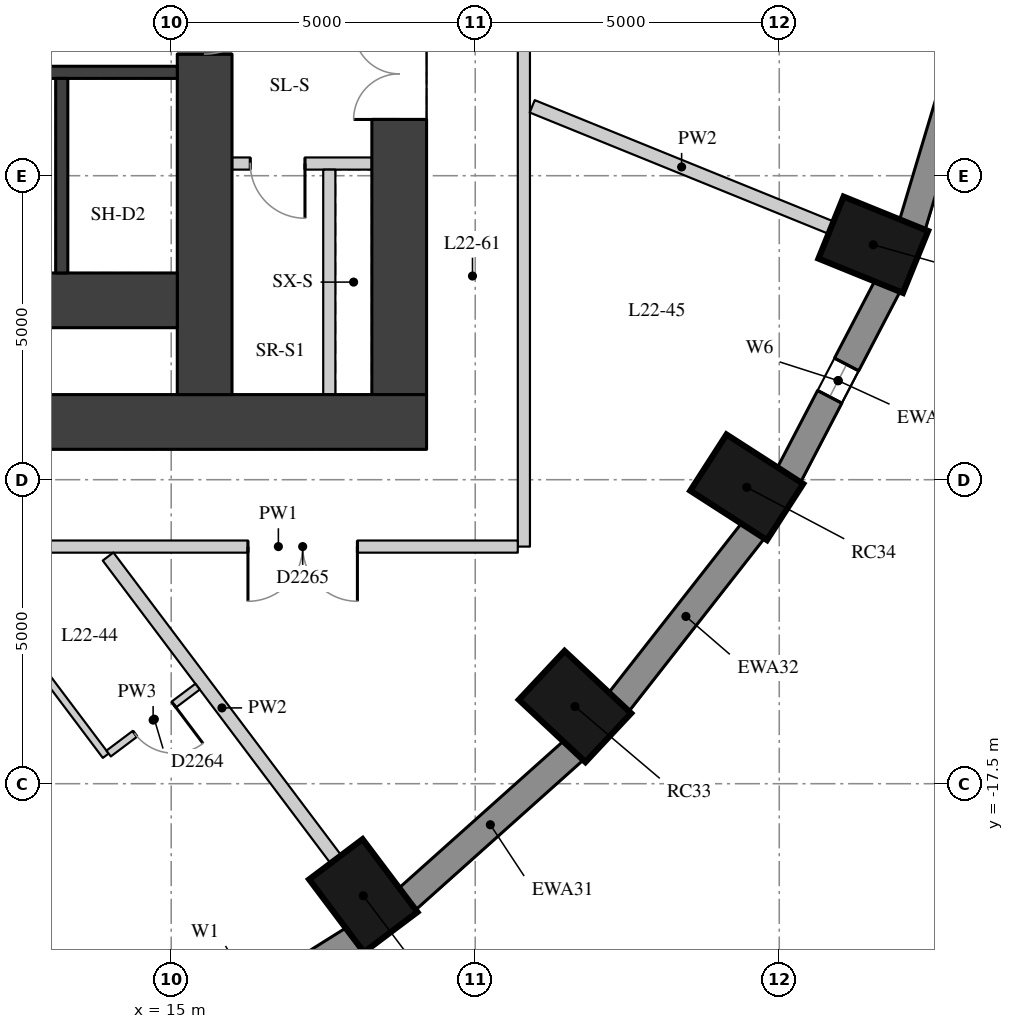
"""IFC4 building model, lengths in metres.
Left out: names, types, materials, properties, quantities, classifications, styles, units other than length and angle.
Written with IfcOpenShell. Run it as: python <this file> out.ifc"""

import sys

from ifc_helpers import new_model, si_unit, direction, frame, frame_2d, origin, origin_2d, place, context, subcontext, project, spatial, rectangle, extrude, element, fill, save


model = new_model("IFC4")
c1 = context("Model", 3, precision=1e-05, world=origin(), true_north=direction((0.0, 1.0)))
c2 = subcontext(c1, "Body", "Model", "MODEL_VIEW")
j1 = project(units=[si_unit("LENGTHUNIT", "METRE"), si_unit("PLANEANGLEUNIT", "RADIAN")], contexts=[c1])
p1 = place(None, origin())
s1 = spatial("IfcSite", under=j1, at=p1, CompositionType="ELEMENT")
p2 = place(p1, origin())
s2 = spatial("IfcBuilding", under=s1, at=p2, CompositionType="ELEMENT")
p3 = place(p2, frame((0.0, 0.0, 81.1)))
s3 = spatial("IfcBuildingStorey", under=s2, at=p3, CompositionType="ELEMENT", Elevation=81.1)
for number, where, z_axis, x_axis in (
    (1, (18.159, -19.343, 0.0), (0.0, 0.0, 1.0), (0.601, -0.799, 0.0)),
    (2, (21.641, -16.23, 0.0), (0.0, 0.0, 1.0), (0.73, -0.683, 0.0)),
    (3, (24.465, -12.625, 0.0), (0.0, 0.0, 1.0), (0.841, -0.541, 0.0)),
    (4, (26.546, -8.636, 0.0), (0.0, 0.0, 1.0), (0.927, -0.376, 0.0)),
):
    element("IfcColumn", number, at=place(p3, frame(where, z_axis=z_axis, x_axis=x_axis)), inside=s3, PredefinedType="COLUMN", context=c2, shape_type="SweptSolid", body=[
        extrude(rectangle(XDim=1.5, YDim=1.1, at=origin_2d()), origin(), (0.0, 0.0, 1.0), 3.3),
    ])
p4 = place(p3, frame((14.817, -22.051, 0.0), z_axis=(0.0, 0.0, 1.0), x_axis=(0.847635480093, 0.530579016629, 0.0)))
e5 = element("IfcWall", 5, at=p4, inside=s3, PredefinedType="SOLIDWALL", context=c2, shape_type="SweptSolid", body=[
    extrude(rectangle(XDim=3.782, YDim=0.45, at=frame_2d((1.891, 0.0))), origin(), (0.0, 0.0, 1.0), 2.85),
])
p5 = place(p4, frame((0.791, 0.0, 0.4)))
e6 = element("IfcOpeningElement", 6, at=p5, cuts=e5, PredefinedType="OPENING", context=c2, shape_type="SweptSolid", body=[
    extrude(rectangle(XDim=2.2, YDim=1.75, at=frame_2d((1.1, 0.875))), frame((0.0, 0.235, 0.0), z_axis=(0.0, -1.0, 0.0), x_axis=(1.0, 0.0, 0.0)), (0.0, 0.0, 1.0), 0.47),
])
p6 = place(p3, frame((18.871, -19.407, 0.0), z_axis=(0.0, 0.0, 1.0), x_axis=(0.745526233716, 0.66647628228, 0.0)))
e7 = element("IfcWall", 7, at=p6, inside=s3, PredefinedType="SOLIDWALL", context=c2, shape_type="SweptSolid", body=[
    extrude(rectangle(XDim=3.697, YDim=0.45, at=frame_2d((1.848, 0.0))), origin(), (0.0, 0.0, 1.0), 2.85),
])
p7 = place(p3, frame((22.352, -16.17, 0.0), z_axis=(0.0, 0.0, 1.0), x_axis=(0.616661975264, 0.787228053529, 0.0)))
e8 = element("IfcWall", 8, at=p7, inside=s3, PredefinedType="SOLIDWALL", context=c2, shape_type="SweptSolid", body=[
    extrude(rectangle(XDim=3.61, YDim=0.45, at=frame_2d((1.805, 0.0))), origin(), (0.0, 0.0, 1.0), 2.85),
])
p8 = place(p3, frame((25.152, -12.437, 0.0), z_axis=(0.0, 0.0, 1.0), x_axis=(0.462492775226, 0.886623050041, 0.0)))
e9 = element("IfcWall", 9, at=p8, inside=s3, PredefinedType="SOLIDWALL", context=c2, shape_type="SweptSolid", body=[
    extrude(rectangle(XDim=3.532, YDim=0.45, at=frame_2d((1.766, 0.0))), origin(), (0.0, 0.0, 1.0), 2.85),
])
p9 = place(p8, frame((1.466, 0.0, 0.4)))
e10 = element("IfcOpeningElement", 10, at=p9, cuts=e9, PredefinedType="OPENING", context=c2, shape_type="SweptSolid", body=[
    extrude(rectangle(XDim=0.6, YDim=1.75, at=frame_2d((0.3, 0.875))), frame((0.0, 0.235, 0.0), z_axis=(0.0, -1.0, 0.0), x_axis=(1.0, 0.0, 0.0)), (0.0, 0.0, 1.0), 0.47),
])
p10 = place(p3, frame((27.185, -8.323, 0.0), z_axis=(0.0, 0.0, 1.0), x_axis=(0.287064133733, 0.957911364963, 0.0)))
e11 = element("IfcWall", 11, at=p10, inside=s3, PredefinedType="SOLIDWALL", context=c2, shape_type="SweptSolid", body=[
    extrude(rectangle(XDim=3.473, YDim=0.45, at=frame_2d((1.737, 0.0))), origin(), (0.0, 0.0, 1.0), 2.85),
])
p11 = place(p3, frame((18.75, -11.1, 0.0), z_axis=(0.0, 0.0, 1.0), x_axis=(0.0, 1.0, 0.0)))
e12 = element("IfcWall", 12, at=p11, inside=s3, PredefinedType="SHEAR", context=c2, shape_type="SweptSolid", body=[
    extrude(rectangle(XDim=22.2, YDim=0.9, at=frame_2d((11.1, 0.0))), origin(), (0.0, 0.0, 1.0), 2.85),
])
p12 = place(p11, frame((15.925, 0.0, 0.0)))
e13 = element("IfcOpeningElement", 13, at=p12, cuts=e12, PredefinedType="OPENING", context=c2, shape_type="SweptSolid", body=[
    extrude(rectangle(XDim=1.5, YDim=2.1, at=frame_2d((0.75, 1.05))), frame((0.0, 0.46, 0.0), z_axis=(0.0, -1.0, 0.0), x_axis=(1.0, 0.0, 0.0)), (0.0, 0.0, 1.0), 0.92),
])
p13 = place(p11, frame((4.525, 0.0, 0.0)))
e14 = element("IfcOpeningElement", 14, at=p13, cuts=e12, PredefinedType="OPENING", context=c2, shape_type="SweptSolid", body=[
    extrude(rectangle(XDim=1.5, YDim=2.1, at=frame_2d((0.75, 1.05))), frame((0.0, 0.46, 0.0), z_axis=(0.0, -1.0, 0.0), x_axis=(1.0, 0.0, 0.0)), (0.0, 0.0, 1.0), 0.92),
])
p14 = place(p3, frame((4.0, -11.55, 0.0), z_axis=(0.0, 0.0, 1.0), x_axis=(1.0, 0.0, 0.0)))
e15 = element("IfcWall", 15, at=p14, inside=s3, PredefinedType="SHEAR", context=c2, shape_type="SweptSolid", body=[
    extrude(rectangle(XDim=15.2, YDim=0.9, at=frame_2d((7.6, 0.0))), origin(), (0.0, 0.0, 1.0), 2.85),
])
p15 = place(p3, frame((15.55, -11.1, 0.0), z_axis=(0.0, 0.0, 1.0), x_axis=(0.0, 1.0, 0.0)))
e16 = element("IfcWall", 16, at=p15, inside=s3, PredefinedType="SHEAR", context=c2, shape_type="SweptSolid", body=[
    extrude(rectangle(XDim=22.2, YDim=0.9, at=frame_2d((11.1, 0.0))), origin(), (0.0, 0.0, 1.0), 2.85),
])
p16 = place(p15, frame((15.6, 0.0, 0.0)))
e17 = element("IfcOpeningElement", 17, at=p16, cuts=e16, PredefinedType="OPENING", context=c2, shape_type="SweptSolid", body=[
    extrude(rectangle(XDim=1.0, YDim=2.1, at=frame_2d((0.5, 1.05))), frame((0.0, 0.46, 0.0), z_axis=(0.0, -1.0, 0.0), x_axis=(1.0, 0.0, 0.0)), (0.0, 0.0, 1.0), 0.92),
])
p17 = place(p15, frame((5.6, 0.0, 0.0)))
e18 = element("IfcOpeningElement", 18, at=p17, cuts=e16, PredefinedType="OPENING", context=c2, shape_type="SweptSolid", body=[
    extrude(rectangle(XDim=1.0, YDim=2.1, at=frame_2d((0.5, 1.05))), frame((0.0, 0.46, 0.0), z_axis=(0.0, -1.0, 0.0), x_axis=(1.0, 0.0, 0.0)), (0.0, 0.0, 1.0), 0.92),
])
p18 = place(p3, frame((4.9, -9.55, 0.0), z_axis=(0.0, 0.0, 1.0), x_axis=(1.0, 0.0, 0.0)))
e19 = element("IfcWall", 19, at=p18, inside=s3, PredefinedType="SHEAR", context=c2, shape_type="SweptSolid", body=[
    extrude(rectangle(XDim=10.2, YDim=0.9, at=frame_2d((5.1, 0.0))), origin(), (0.0, 0.0, 1.0), 2.85),
])
p19 = place(p3, frame((4.9, -5.8, 0.0), z_axis=(0.0, 0.0, 1.0), x_axis=(1.0, 0.0, 0.0)))
e20 = element("IfcWall", 20, at=p19, inside=s3, PredefinedType="SHEAR", context=c2, shape_type="SweptSolid", body=[
    extrude(rectangle(XDim=10.2, YDim=0.2, at=frame_2d((5.1, 0.0))), origin(), (0.0, 0.0, 1.0), 2.85),
])
p20 = place(p3, frame((13.2, -9.1, 0.0), z_axis=(0.0, 0.0, 1.0), x_axis=(0.0, 1.0, 0.0)))
e21 = element("IfcWall", 21, at=p20, inside=s3, PredefinedType="SHEAR", context=c2, shape_type="SweptSolid", body=[
    extrude(rectangle(XDim=3.2, YDim=0.2, at=frame_2d((1.6, 0.0))), origin(), (0.0, 0.0, 1.0), 2.85),
])
p21 = place(p3, frame((16.0, -7.3, 0.0), z_axis=(0.0, 0.0, 1.0), x_axis=(1.0, 0.0, 0.0)))
e22 = element("IfcWall", 22, at=p21, inside=s3, PredefinedType="PARTITIONING", context=c2, shape_type="SweptSolid", body=[
    extrude(rectangle(XDim=2.3, YDim=0.2, at=frame_2d((1.15, 0.0))), origin(), (0.0, 0.0, 1.0), 2.85),
])
p22 = place(p21, frame((0.3, 0.0, 0.0)))
e23 = element("IfcOpeningElement", 23, at=p22, cuts=e22, PredefinedType="OPENING", context=c2, shape_type="SweptSolid", body=[
    extrude(rectangle(XDim=0.9, YDim=2.1, at=frame_2d((0.45, 1.05))), frame((0.0, 0.11, 0.0), z_axis=(0.0, -1.0, 0.0), x_axis=(1.0, 0.0, 0.0)), (0.0, 0.0, 1.0), 0.22),
])
p23 = place(p3, frame((17.6, -11.1, 0.0), z_axis=(0.0, 0.0, 1.0), x_axis=(0.0, 1.0, 0.0)))
e24 = element("IfcWall", 24, at=p23, inside=s3, PredefinedType="PARTITIONING", context=c2, shape_type="SweptSolid", body=[
    extrude(rectangle(XDim=3.7, YDim=0.2, at=frame_2d((1.85, 0.0))), origin(), (0.0, 0.0, 1.0), 2.85),
])
p24 = place(p3, frame((20.8, 13.5, 0.0), z_axis=(0.0, 0.0, 1.0), x_axis=(0.0, -1.0, 0.0)))
e25 = element("IfcWall", 25, at=p24, inside=s3, PredefinedType="PARTITIONING", context=c2, shape_type="SweptSolid", body=[
    extrude(rectangle(XDim=27.1, YDim=0.2, at=frame_2d((13.55, 0.0))), origin(), (0.0, 0.0, 1.0), 2.85),
])
p25 = place(p24, frame((14.149, 0.0, 0.0)))
e26 = element("IfcOpeningElement", 26, at=p25, cuts=e25, PredefinedType="OPENING", context=c2, shape_type="SweptSolid", body=[
    extrude(rectangle(XDim=1.8, YDim=2.1, at=frame_2d((0.9, 1.05))), frame((0.0, 0.11, 0.0), z_axis=(0.0, -1.0, 0.0), x_axis=(1.0, 0.0, 0.0)), (0.0, 0.0, 1.0), 0.22),
])
p26 = place(p24, frame((4.454, 0.0, 0.0)))
e27 = element("IfcOpeningElement", 27, at=p26, cuts=e25, PredefinedType="OPENING", context=c2, shape_type="SweptSolid", body=[
    extrude(rectangle(XDim=1.8, YDim=2.1, at=frame_2d((0.9, 1.05))), frame((0.0, 0.11, 0.0), z_axis=(0.0, -1.0, 0.0), x_axis=(1.0, 0.0, 0.0)), (0.0, 0.0, 1.0), 0.22),
])
p27 = place(p3, frame((20.7, -13.6, 0.0), z_axis=(0.0, 0.0, 1.0), x_axis=(-1.0, 0.0, 0.0)))
e28 = element("IfcWall", 28, at=p27, inside=s3, PredefinedType="PARTITIONING", context=c2, shape_type="SweptSolid", body=[
    extrude(rectangle(XDim=7.875, YDim=0.2, at=frame_2d((3.938, 0.0))), origin(), (0.0, 0.0, 1.0), 2.85),
])
p28 = place(p27, frame((2.638, 0.0, 0.0)))
e29 = element("IfcOpeningElement", 29, at=p28, cuts=e28, PredefinedType="OPENING", context=c2, shape_type="SweptSolid", body=[
    extrude(rectangle(XDim=1.8, YDim=2.1, at=frame_2d((0.9, 1.05))), frame((0.0, 0.11, 0.0), z_axis=(0.0, -1.0, 0.0), x_axis=(1.0, 0.0, 0.0)), (0.0, 0.0, 1.0), 0.22),
])
p29 = place(p3, frame((17.708, -18.743, 0.0), z_axis=(0.0, 0.0, 1.0), x_axis=(-0.601177883261, 0.799115231164, 0.0)))
e30 = element("IfcWall", 30, at=p29, inside=s3, PredefinedType="PARTITIONING", context=c2, shape_type="SweptSolid", body=[
    extrude(rectangle(XDim=6.231, YDim=0.22, at=frame_2d((3.116, 0.0))), origin(), (0.0, 0.0, 1.0), 2.85),
])
p30 = place(p3, frame((25.851, -8.354, 0.0), z_axis=(0.0, 0.0, 1.0), x_axis=(-0.926546814299, 0.376179479653, 0.0)))
e31 = element("IfcWall", 31, at=p30, inside=s3, PredefinedType="PARTITIONING", context=c2, shape_type="SweptSolid", body=[
    extrude(rectangle(XDim=5.304, YDim=0.22, at=frame_2d((2.652, 0.0))), origin(), (0.0, 0.0, 1.0), 2.85),
])
p31 = place(p3, frame((11.825, -14.251, 0.0), z_axis=(0.0, 0.0, 1.0), x_axis=(0.601196964615, -0.799100875821, 0.0)))
e32 = element("IfcWall", 32, at=p31, inside=s3, PredefinedType="PARTITIONING", context=c2, shape_type="SweptSolid", body=[
    extrude(rectangle(XDim=3.49, YDim=0.12, at=frame_2d((1.745, 0.0))), origin(), (0.0, 0.0, 1.0), 2.85),
])
p32 = place(p3, frame((13.971, -17.004, 0.0), z_axis=(0.0, 0.0, 1.0), x_axis=(0.799231057954, 0.60102388971, 0.0)))
e33 = element("IfcWall", 33, at=p32, inside=s3, PredefinedType="PARTITIONING", context=c2, shape_type="SweptSolid", body=[
    extrude(rectangle(XDim=1.83, YDim=0.12, at=frame_2d((0.915, 0.0))), origin(), (0.0, 0.0, 1.0), 2.85),
])
p33 = place(p32, frame((0.54, 0.0, 0.0)))
e34 = element("IfcOpeningElement", 34, at=p33, cuts=e33, PredefinedType="OPENING", context=c2, shape_type="SweptSolid", body=[
    extrude(rectangle(XDim=0.8, YDim=2.1, at=frame_2d((0.4, 1.05))), frame((0.0, 0.07, 0.0), z_axis=(0.0, -1.0, 0.0), x_axis=(1.0, 0.0, 0.0)), (0.0, 0.0, 1.0), 0.14),
])
p34 = place(p9, origin())
e35 = element("IfcWindow", 35, at=p34, inside=s3, PartitioningType="SINGLE_PANEL", PredefinedType="WINDOW", context=c2, shape_type="SweptSolid", body=[
    extrude(rectangle(XDim=0.6, YDim=1.75, at=frame_2d((0.3, 0.875))), frame((0.0, 0.035, 0.0), z_axis=(0.0, -1.0, 0.0), x_axis=(1.0, 0.0, 0.0)), (0.0, 0.0, 1.0), 0.06),
])
fill(e10, e35)
p35 = place(p13, origin())
e36 = element("IfcDoor", 36, at=p35, inside=s3, OperationType="DOUBLE_DOOR_SINGLE_SWING", PredefinedType="DOOR", context=c2, shape_type="SweptSolid", body=[
    extrude(rectangle(XDim=1.5, YDim=2.1, at=frame_2d((0.75, 1.05))), frame((0.0, 0.025, 0.0), z_axis=(0.0, -1.0, 0.0), x_axis=(1.0, 0.0, 0.0)), (0.0, 0.0, 1.0), 0.05),
])
fill(e14, e36)
p36 = place(p17, origin())
e37 = element("IfcDoor", 37, at=p36, inside=s3, OperationType="SINGLE_SWING_LEFT", PredefinedType="DOOR", context=c2, shape_type="SweptSolid", body=[
    extrude(rectangle(XDim=1.0, YDim=2.1, at=frame_2d((0.5, 1.05))), frame((0.0, 0.025, 0.0), z_axis=(0.0, -1.0, 0.0), x_axis=(1.0, 0.0, 0.0)), (0.0, 0.0, 1.0), 0.05),
])
fill(e18, e37)
p37 = place(p22, origin())
e38 = element("IfcDoor", 38, at=p37, inside=s3, OperationType="SINGLE_SWING_LEFT", PredefinedType="DOOR", context=c2, shape_type="SweptSolid", body=[
    extrude(rectangle(XDim=0.9, YDim=2.1, at=frame_2d((0.45, 1.05))), frame((0.0, 0.025, 0.0), z_axis=(0.0, -1.0, 0.0), x_axis=(1.0, 0.0, 0.0)), (0.0, 0.0, 1.0), 0.05),
])
fill(e23, e38)
p38 = place(p33, origin())
e39 = element("IfcDoor", 39, at=p38, inside=s3, OperationType="SINGLE_SWING_LEFT", PredefinedType="DOOR", context=c2, shape_type="SweptSolid", body=[
    extrude(rectangle(XDim=0.8, YDim=2.1, at=frame_2d((0.4, 1.05))), frame((0.0, 0.025, 0.0), z_axis=(0.0, -1.0, 0.0), x_axis=(1.0, 0.0, 0.0)), (0.0, 0.0, 1.0), 0.05),
])
fill(e34, e39)
p39 = place(p28, origin())
e40 = element("IfcDoor", 40, at=p39, inside=s3, OperationType="DOUBLE_DOOR_SINGLE_SWING", PredefinedType="DOOR", context=c2, shape_type="SweptSolid", body=[
    extrude(rectangle(XDim=1.8, YDim=2.1, at=frame_2d((0.9, 1.05))), frame((0.0, 0.025, 0.0), z_axis=(0.0, -1.0, 0.0), x_axis=(1.0, 0.0, 0.0)), (0.0, 0.0, 1.0), 0.05),
])
fill(e29, e40)
save(model, sys.argv[1])
